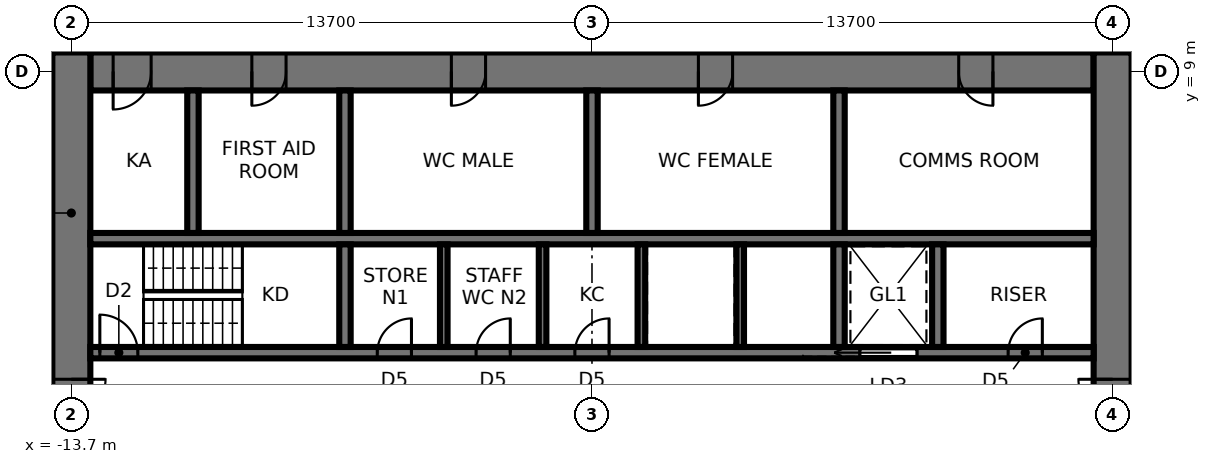
"""IFC4 building model, lengths in metres.
Left out: names, types, materials, properties, quantities, classifications, styles, units other than length and angle.
Written with IfcOpenShell. Run it as: python <this file> out.ifc"""

import sys

from ifc_helpers import new_model, si_unit, direction, frame, frame_2d, origin, place, context, subcontext, project, spatial, rectangle, extrude, element, fill, save


model = new_model("IFC4")
c1 = context("Model", 3, precision=1e-05, world=origin(), true_north=direction((0.0, 1.0)))
c2 = subcontext(c1, "Body", "Model", "MODEL_VIEW")
j1 = project(units=[si_unit("LENGTHUNIT", "METRE"), si_unit("PLANEANGLEUNIT", "RADIAN")], contexts=[c1])
p1 = place(None, origin())
s1 = spatial("IfcSite", under=j1, at=p1, CompositionType="ELEMENT")
p2 = place(p1, origin())
s2 = spatial("IfcBuilding", under=s1, at=p2, CompositionType="ELEMENT")
p3 = place(p2, frame((0.0, 0.0, 108.0)))
s3 = spatial("IfcBuildingStorey", under=s2, at=p3, CompositionType="ELEMENT", Elevation=108.0)
p4 = place(p3, frame((13.2, 9.0, 0.0), z_axis=(0.0, 0.0, 1.0), x_axis=(-1.0, 0.0, 0.0)))
e1 = element("IfcWall", 1, at=p4, inside=s3, PredefinedType="SHEAR", context=c2, shape_type="SweptSolid", body=[
    extrude(rectangle(XDim=26.4, YDim=1.0, at=frame_2d((13.2, 0.0))), origin(), (0.0, 0.0, 1.0), 3.9),
])
p5 = place(p4, frame((2.65, 0.0, 0.0)))
e2 = element("IfcOpeningElement", 2, at=p5, cuts=e1, PredefinedType="OPENING", context=c2, shape_type="SweptSolid", body=[
    extrude(rectangle(XDim=0.9, YDim=2.1, at=frame_2d((0.45, 1.05))), frame((0.0, 0.51, 0.0), z_axis=(0.0, -1.0, 0.0), x_axis=(1.0, 0.0, 0.0)), (0.0, 0.0, 1.0), 1.02),
])
p6 = place(p4, frame((9.5, 0.0, 0.0)))
e3 = element("IfcOpeningElement", 3, at=p6, cuts=e1, PredefinedType="OPENING", context=c2, shape_type="SweptSolid", body=[
    extrude(rectangle(XDim=0.9, YDim=2.1, at=frame_2d((0.45, 1.05))), frame((0.0, 0.51, 0.0), z_axis=(0.0, -1.0, 0.0), x_axis=(1.0, 0.0, 0.0)), (0.0, 0.0, 1.0), 1.02),
])
p7 = place(p4, frame((16.0, 0.0, 0.0)))
e4 = element("IfcOpeningElement", 4, at=p7, cuts=e1, PredefinedType="OPENING", context=c2, shape_type="SweptSolid", body=[
    extrude(rectangle(XDim=0.9, YDim=2.1, at=frame_2d((0.45, 1.05))), frame((0.0, 0.51, 0.0), z_axis=(0.0, -1.0, 0.0), x_axis=(1.0, 0.0, 0.0)), (0.0, 0.0, 1.0), 1.02),
])
p8 = place(p4, frame((21.25, 0.0, 0.0)))
e5 = element("IfcOpeningElement", 5, at=p8, cuts=e1, PredefinedType="OPENING", context=c2, shape_type="SweptSolid", body=[
    extrude(rectangle(XDim=0.9, YDim=2.1, at=frame_2d((0.45, 1.05))), frame((0.0, 0.51, 0.0), z_axis=(0.0, -1.0, 0.0), x_axis=(1.0, 0.0, 0.0)), (0.0, 0.0, 1.0), 1.02),
])
p9 = place(p4, frame((24.8, 0.0, 0.0)))
e6 = element("IfcOpeningElement", 6, at=p9, cuts=e1, PredefinedType="OPENING", context=c2, shape_type="SweptSolid", body=[
    extrude(rectangle(XDim=1.0, YDim=2.1, at=frame_2d((0.5, 1.05))), frame((0.0, 0.51, 0.0), z_axis=(0.0, -1.0, 0.0), x_axis=(1.0, 0.0, 0.0)), (0.0, 0.0, 1.0), 1.02),
])
p10 = place(p3, frame((13.7, -9.5, 0.0), z_axis=(0.0, 0.0, 1.0), x_axis=(0.0, 1.0, 0.0)))
e7 = element("IfcWall", 7, at=p10, inside=s3, PredefinedType="SHEAR", context=c2, shape_type="SweptSolid", body=[
    extrude(rectangle(XDim=19.0, YDim=1.0, at=frame_2d((9.5, 0.0))), origin(), (0.0, 0.0, 1.0), 3.9),
])
p11 = place(p10, frame((8.6, 0.0, 0.0)))
e8 = element("IfcOpeningElement", 8, at=p11, cuts=e7, PredefinedType="OPENING", context=c2, shape_type="SweptSolid", body=[
    extrude(rectangle(XDim=1.8, YDim=2.4, at=frame_2d((0.9, 1.2))), frame((0.0, 0.51, 0.0), z_axis=(0.0, -1.0, 0.0), x_axis=(1.0, 0.0, 0.0)), (0.0, 0.0, 1.0), 1.02),
])
p12 = place(p3, frame((-13.7, 9.5, 0.0), z_axis=(0.0, 0.0, 1.0), x_axis=(0.0, -1.0, 0.0)))
e9 = element("IfcWall", 9, at=p12, inside=s3, PredefinedType="SHEAR", context=c2, shape_type="SweptSolid", body=[
    extrude(rectangle(XDim=19.0, YDim=1.0, at=frame_2d((9.5, 0.0))), origin(), (0.0, 0.0, 1.0), 3.9),
])
p13 = place(p12, frame((8.6, 0.0, 0.0)))
e10 = element("IfcOpeningElement", 10, at=p13, cuts=e9, PredefinedType="OPENING", context=c2, shape_type="SweptSolid", body=[
    extrude(rectangle(XDim=1.8, YDim=2.4, at=frame_2d((0.9, 1.2))), frame((0.0, 0.51, 0.0), z_axis=(0.0, -1.0, 0.0), x_axis=(1.0, 0.0, 0.0)), (0.0, 0.0, 1.0), 1.02),
])
p14 = place(p3, frame((-13.2, 1.6, 0.0), z_axis=(0.0, 0.0, 1.0), x_axis=(1.0, 0.0, 0.0)))
e11 = element("IfcWall", 11, at=p14, inside=s3, PredefinedType="SHEAR", context=c2, shape_type="SweptSolid", body=[
    extrude(rectangle(XDim=26.4, YDim=0.3, at=frame_2d((13.2, 0.0))), origin(), (0.0, 0.0, 1.0), 3.9),
])
p15 = place(p14, frame((0.25, 0.0, 0.0)))
e12 = element("IfcOpeningElement", 12, at=p15, cuts=e11, PredefinedType="OPENING", context=c2, shape_type="SweptSolid", body=[
    extrude(rectangle(XDim=1.0, YDim=2.1, at=frame_2d((0.5, 1.05))), frame((0.0, 0.16, 0.0), z_axis=(0.0, -1.0, 0.0), x_axis=(1.0, 0.0, 0.0)), (0.0, 0.0, 1.0), 0.32),
])
p16 = place(p14, frame((20.25, 0.0, 0.0)))
e13 = element("IfcOpeningElement", 13, at=p16, cuts=e11, PredefinedType="OPENING", context=c2, shape_type="SweptSolid", body=[
    extrude(rectangle(XDim=1.5, YDim=2.4, at=frame_2d((0.75, 1.2))), frame((0.0, 0.16, 0.0), z_axis=(0.0, -1.0, 0.0), x_axis=(1.0, 0.0, 0.0)), (0.0, 0.0, 1.0), 0.32),
])
p17 = place(p14, frame((7.55, 0.0, 0.0)))
e14 = element("IfcOpeningElement", 14, at=p17, cuts=e11, PredefinedType="OPENING", context=c2, shape_type="SweptSolid", body=[
    extrude(rectangle(XDim=0.9, YDim=2.1, at=frame_2d((0.45, 1.05))), frame((0.0, 0.16, 0.0), z_axis=(0.0, -1.0, 0.0), x_axis=(1.0, 0.0, 0.0)), (0.0, 0.0, 1.0), 0.32),
])
p18 = place(p14, frame((10.15, 0.0, 0.0)))
e15 = element("IfcOpeningElement", 15, at=p18, cuts=e11, PredefinedType="OPENING", context=c2, shape_type="SweptSolid", body=[
    extrude(rectangle(XDim=0.9, YDim=2.1, at=frame_2d((0.45, 1.05))), frame((0.0, 0.16, 0.0), z_axis=(0.0, -1.0, 0.0), x_axis=(1.0, 0.0, 0.0)), (0.0, 0.0, 1.0), 0.32),
])
p19 = place(p14, frame((12.75, 0.0, 0.0)))
e16 = element("IfcOpeningElement", 16, at=p19, cuts=e11, PredefinedType="OPENING", context=c2, shape_type="SweptSolid", body=[
    extrude(rectangle(XDim=0.9, YDim=2.1, at=frame_2d((0.45, 1.05))), frame((0.0, 0.16, 0.0), z_axis=(0.0, -1.0, 0.0), x_axis=(1.0, 0.0, 0.0)), (0.0, 0.0, 1.0), 0.32),
])
p20 = place(p14, frame((24.15, 0.0, 0.0)))
e17 = element("IfcOpeningElement", 17, at=p20, cuts=e11, PredefinedType="OPENING", context=c2, shape_type="SweptSolid", body=[
    extrude(rectangle(XDim=0.9, YDim=2.1, at=frame_2d((0.45, 1.05))), frame((0.0, 0.16, 0.0), z_axis=(0.0, -1.0, 0.0), x_axis=(1.0, 0.0, 0.0)), (0.0, 0.0, 1.0), 0.32),
])
p21 = place(p3, frame((-13.2, 4.6, 0.0), z_axis=(0.0, 0.0, 1.0), x_axis=(1.0, 0.0, 0.0)))
e18 = element("IfcWall", 18, at=p21, inside=s3, PredefinedType="SHEAR", context=c2, shape_type="SweptSolid", body=[
    extrude(rectangle(XDim=26.4, YDim=0.3, at=frame_2d((13.2, 0.0))), origin(), (0.0, 0.0, 1.0), 3.9),
])
p22 = place(p3, frame((-6.5, 1.75, 0.0), z_axis=(0.0, 0.0, 1.0), x_axis=(0.0, 1.0, 0.0)))
e19 = element("IfcWall", 19, at=p22, inside=s3, PredefinedType="SHEAR", context=c2, shape_type="SweptSolid", body=[
    extrude(rectangle(XDim=2.7, YDim=0.3, at=frame_2d((1.35, 0.0))), origin(), (0.0, 0.0, 1.0), 3.9),
])
p23 = place(p3, frame((-6.5, 4.75, 0.0), z_axis=(0.0, 0.0, 1.0), x_axis=(0.0, 1.0, 0.0)))
e20 = element("IfcWall", 20, at=p23, inside=s3, PredefinedType="SHEAR", context=c2, shape_type="SweptSolid", body=[
    extrude(rectangle(XDim=3.75, YDim=0.3, at=frame_2d((1.875, 0.0))), origin(), (0.0, 0.0, 1.0), 3.9),
])
p24 = place(p3, frame((6.5, 1.75, 0.0), z_axis=(0.0, 0.0, 1.0), x_axis=(0.0, 1.0, 0.0)))
e21 = element("IfcWall", 21, at=p24, inside=s3, PredefinedType="SHEAR", context=c2, shape_type="SweptSolid", body=[
    extrude(rectangle(XDim=2.7, YDim=0.3, at=frame_2d((1.35, 0.0))), origin(), (0.0, 0.0, 1.0), 3.9),
])
p25 = place(p3, frame((6.5, 4.75, 0.0), z_axis=(0.0, 0.0, 1.0), x_axis=(0.0, 1.0, 0.0)))
e22 = element("IfcWall", 22, at=p25, inside=s3, PredefinedType="SHEAR", context=c2, shape_type="SweptSolid", body=[
    extrude(rectangle(XDim=3.75, YDim=0.3, at=frame_2d((1.875, 0.0))), origin(), (0.0, 0.0, 1.0), 3.9),
])
for number, where, z_axis, x_axis in (
    (23, (-3.9, 1.75, 0.0), (0.0, 0.0, 1.0), (0.0, 1.0, 0.0)),
    (24, (-1.3, 1.75, 0.0), (0.0, 0.0, 1.0), (0.0, 1.0, 0.0)),
    (25, (1.3, 1.75, 0.0), (0.0, 0.0, 1.0), (0.0, 1.0, 0.0)),
    (26, (3.9, 1.75, 0.0), (0.0, 0.0, 1.0), (0.0, 1.0, 0.0)),
):
    element("IfcWall", number, at=place(p3, frame(where, z_axis=z_axis, x_axis=x_axis)), inside=s3, PredefinedType="SHEAR", context=c2, shape_type="SweptSolid", body=[
        extrude(rectangle(XDim=2.7, YDim=0.2, at=frame_2d((1.35, 0.0))), origin(), (0.0, 0.0, 1.0), 3.9),
    ])
for number, where, z_axis, x_axis in (
    (27, (0.0, 4.75, 0.0), (0.0, 0.0, 1.0), (0.0, 1.0, 0.0)),
    (28, (-10.5, 4.75, 0.0), (0.0, 0.0, 1.0), (0.0, 1.0, 0.0)),
):
    element("IfcWall", number, at=place(p3, frame(where, z_axis=z_axis, x_axis=x_axis)), inside=s3, PredefinedType="SHEAR", context=c2, shape_type="SweptSolid", body=[
        extrude(rectangle(XDim=3.75, YDim=0.3, at=frame_2d((1.875, 0.0))), origin(), (0.0, 0.0, 1.0), 3.9),
    ])
p26 = place(p3, frame((9.1, 1.75, 0.0), z_axis=(0.0, 0.0, 1.0), x_axis=(0.0, 1.0, 0.0)))
e29 = element("IfcWall", 29, at=p26, inside=s3, PredefinedType="SHEAR", context=c2, shape_type="SweptSolid", body=[
    extrude(rectangle(XDim=2.7, YDim=0.3, at=frame_2d((1.35, 0.0))), origin(), (0.0, 0.0, 1.0), 3.9),
])
p27 = place(p13, origin())
e30 = element("IfcDoor", 30, at=p27, inside=s3, OperationType="DOUBLE_DOOR_SINGLE_SWING", PredefinedType="DOOR", context=c2, shape_type="SweptSolid", body=[
    extrude(rectangle(XDim=1.72, YDim=2.36, at=frame_2d((0.9, 1.18))), frame((0.0, 0.025, 0.0), z_axis=(0.0, -1.0, 0.0), x_axis=(1.0, 0.0, 0.0)), (0.0, 0.0, 1.0), 0.05),
    extrude(rectangle(XDim=0.04, YDim=2.4, at=frame_2d((0.02, 1.2))), frame((0.0, 0.25, 0.0), z_axis=(0.0, -1.0, 0.0), x_axis=(1.0, 0.0, 0.0)), (0.0, 0.0, 1.0), 0.5),
    extrude(rectangle(XDim=0.04, YDim=2.4, at=frame_2d((1.78, 1.2))), frame((0.0, 0.25, 0.0), z_axis=(0.0, -1.0, 0.0), x_axis=(1.0, 0.0, 0.0)), (0.0, 0.0, 1.0), 0.5),
    extrude(rectangle(XDim=1.72, YDim=0.04, at=frame_2d((0.9, 2.38))), frame((0.0, 0.25, 0.0), z_axis=(0.0, -1.0, 0.0), x_axis=(1.0, 0.0, 0.0)), (0.0, 0.0, 1.0), 0.5),
])
fill(e10, e30)
p28 = place(p11, origin())
e31 = element("IfcDoor", 31, at=p28, inside=s3, OperationType="DOUBLE_DOOR_SINGLE_SWING", PredefinedType="DOOR", context=c2, shape_type="SweptSolid", body=[
    extrude(rectangle(XDim=1.72, YDim=2.36, at=frame_2d((0.9, 1.18))), frame((0.0, 0.025, 0.0), z_axis=(0.0, -1.0, 0.0), x_axis=(1.0, 0.0, 0.0)), (0.0, 0.0, 1.0), 0.05),
    extrude(rectangle(XDim=0.04, YDim=2.4, at=frame_2d((0.02, 1.2))), frame((0.0, 0.25, 0.0), z_axis=(0.0, -1.0, 0.0), x_axis=(1.0, 0.0, 0.0)), (0.0, 0.0, 1.0), 0.5),
    extrude(rectangle(XDim=0.04, YDim=2.4, at=frame_2d((1.78, 1.2))), frame((0.0, 0.25, 0.0), z_axis=(0.0, -1.0, 0.0), x_axis=(1.0, 0.0, 0.0)), (0.0, 0.0, 1.0), 0.5),
    extrude(rectangle(XDim=1.72, YDim=0.04, at=frame_2d((0.9, 2.38))), frame((0.0, 0.25, 0.0), z_axis=(0.0, -1.0, 0.0), x_axis=(1.0, 0.0, 0.0)), (0.0, 0.0, 1.0), 0.5),
])
fill(e8, e31)
p29 = place(p15, origin())
e32 = element("IfcDoor", 32, at=p29, inside=s3, OperationType="SINGLE_SWING_LEFT", PredefinedType="DOOR", context=c2, shape_type="SweptSolid", body=[
    extrude(rectangle(XDim=1.0, YDim=2.1, at=frame_2d((0.5, 1.05))), frame((0.0, 0.025, 0.0), z_axis=(0.0, -1.0, 0.0), x_axis=(1.0, 0.0, 0.0)), (0.0, 0.0, 1.0), 0.05),
])
fill(e12, e32)
p30 = place(p16, origin())
e33 = element("IfcDoor", 33, at=p30, inside=s3, OperationType="SLIDING_TO_LEFT", PredefinedType="DOOR", context=c2, shape_type="SweptSolid", body=[
    extrude(rectangle(XDim=1.5, YDim=2.4, at=frame_2d((0.75, 1.2))), frame((0.0, 0.025, 0.0), z_axis=(0.0, -1.0, 0.0), x_axis=(1.0, 0.0, 0.0)), (0.0, 0.0, 1.0), 0.05),
])
fill(e13, e33)
p31 = place(p17, origin())
e34 = element("IfcDoor", 34, at=p31, inside=s3, OperationType="SINGLE_SWING_RIGHT", PredefinedType="DOOR", context=c2, shape_type="SweptSolid", body=[
    extrude(rectangle(XDim=0.9, YDim=2.1, at=frame_2d((0.45, 1.05))), frame((0.0, 0.025, 0.0), z_axis=(0.0, -1.0, 0.0), x_axis=(1.0, 0.0, 0.0)), (0.0, 0.0, 1.0), 0.05),
])
fill(e14, e34)
p32 = place(p18, origin())
e35 = element("IfcDoor", 35, at=p32, inside=s3, OperationType="SINGLE_SWING_RIGHT", PredefinedType="DOOR", context=c2, shape_type="SweptSolid", body=[
    extrude(rectangle(XDim=0.9, YDim=2.1, at=frame_2d((0.45, 1.05))), frame((0.0, 0.025, 0.0), z_axis=(0.0, -1.0, 0.0), x_axis=(1.0, 0.0, 0.0)), (0.0, 0.0, 1.0), 0.05),
])
fill(e15, e35)
p33 = place(p19, origin())
e36 = element("IfcDoor", 36, at=p33, inside=s3, OperationType="SINGLE_SWING_RIGHT", PredefinedType="DOOR", context=c2, shape_type="SweptSolid", body=[
    extrude(rectangle(XDim=0.9, YDim=2.1, at=frame_2d((0.45, 1.05))), frame((0.0, 0.025, 0.0), z_axis=(0.0, -1.0, 0.0), x_axis=(1.0, 0.0, 0.0)), (0.0, 0.0, 1.0), 0.05),
])
fill(e16, e36)
p34 = place(p20, origin())
e37 = element("IfcDoor", 37, at=p34, inside=s3, OperationType="SINGLE_SWING_RIGHT", PredefinedType="DOOR", context=c2, shape_type="SweptSolid", body=[
    extrude(rectangle(XDim=0.9, YDim=2.1, at=frame_2d((0.45, 1.05))), frame((0.0, 0.025, 0.0), z_axis=(0.0, -1.0, 0.0), x_axis=(1.0, 0.0, 0.0)), (0.0, 0.0, 1.0), 0.05),
])
fill(e17, e37)
p35 = place(p5, origin())
e38 = element("IfcDoor", 38, at=p35, inside=s3, OperationType="SINGLE_SWING_LEFT", PredefinedType="DOOR", context=c2, shape_type="SweptSolid", body=[
    extrude(rectangle(XDim=0.82, YDim=2.06, at=frame_2d((0.45, 1.03))), frame((0.0, 0.025, 0.0), z_axis=(0.0, -1.0, 0.0), x_axis=(1.0, 0.0, 0.0)), (0.0, 0.0, 1.0), 0.05),
    extrude(rectangle(XDim=0.04, YDim=2.1, at=frame_2d((0.02, 1.05))), frame((0.0, 0.25, 0.0), z_axis=(0.0, -1.0, 0.0), x_axis=(1.0, 0.0, 0.0)), (0.0, 0.0, 1.0), 0.5),
    extrude(rectangle(XDim=0.04, YDim=2.1, at=frame_2d((0.88, 1.05))), frame((0.0, 0.25, 0.0), z_axis=(0.0, -1.0, 0.0), x_axis=(1.0, 0.0, 0.0)), (0.0, 0.0, 1.0), 0.5),
    extrude(rectangle(XDim=0.82, YDim=0.04, at=frame_2d((0.45, 2.08))), frame((0.0, 0.25, 0.0), z_axis=(0.0, -1.0, 0.0), x_axis=(1.0, 0.0, 0.0)), (0.0, 0.0, 1.0), 0.5),
])
fill(e2, e38)
p36 = place(p6, origin())
e39 = element("IfcDoor", 39, at=p36, inside=s3, OperationType="SINGLE_SWING_RIGHT", PredefinedType="DOOR", context=c2, shape_type="SweptSolid", body=[
    extrude(rectangle(XDim=0.82, YDim=2.06, at=frame_2d((0.45, 1.03))), frame((0.0, 0.025, 0.0), z_axis=(0.0, -1.0, 0.0), x_axis=(1.0, 0.0, 0.0)), (0.0, 0.0, 1.0), 0.05),
    extrude(rectangle(XDim=0.04, YDim=2.1, at=frame_2d((0.02, 1.05))), frame((0.0, 0.25, 0.0), z_axis=(0.0, -1.0, 0.0), x_axis=(1.0, 0.0, 0.0)), (0.0, 0.0, 1.0), 0.5),
    extrude(rectangle(XDim=0.04, YDim=2.1, at=frame_2d((0.88, 1.05))), frame((0.0, 0.25, 0.0), z_axis=(0.0, -1.0, 0.0), x_axis=(1.0, 0.0, 0.0)), (0.0, 0.0, 1.0), 0.5),
    extrude(rectangle(XDim=0.82, YDim=0.04, at=frame_2d((0.45, 2.08))), frame((0.0, 0.25, 0.0), z_axis=(0.0, -1.0, 0.0), x_axis=(1.0, 0.0, 0.0)), (0.0, 0.0, 1.0), 0.5),
])
fill(e3, e39)
p37 = place(p7, origin())
e40 = element("IfcDoor", 40, at=p37, inside=s3, OperationType="SINGLE_SWING_RIGHT", PredefinedType="DOOR", context=c2, shape_type="SweptSolid", body=[
    extrude(rectangle(XDim=0.82, YDim=2.06, at=frame_2d((0.45, 1.03))), frame((0.0, 0.025, 0.0), z_axis=(0.0, -1.0, 0.0), x_axis=(1.0, 0.0, 0.0)), (0.0, 0.0, 1.0), 0.05),
    extrude(rectangle(XDim=0.04, YDim=2.1, at=frame_2d((0.02, 1.05))), frame((0.0, 0.25, 0.0), z_axis=(0.0, -1.0, 0.0), x_axis=(1.0, 0.0, 0.0)), (0.0, 0.0, 1.0), 0.5),
    extrude(rectangle(XDim=0.04, YDim=2.1, at=frame_2d((0.88, 1.05))), frame((0.0, 0.25, 0.0), z_axis=(0.0, -1.0, 0.0), x_axis=(1.0, 0.0, 0.0)), (0.0, 0.0, 1.0), 0.5),
    extrude(rectangle(XDim=0.82, YDim=0.04, at=frame_2d((0.45, 2.08))), frame((0.0, 0.25, 0.0), z_axis=(0.0, -1.0, 0.0), x_axis=(1.0, 0.0, 0.0)), (0.0, 0.0, 1.0), 0.5),
])
fill(e4, e40)
p38 = place(p8, origin())
e41 = element("IfcDoor", 41, at=p38, inside=s3, OperationType="SINGLE_SWING_RIGHT", PredefinedType="DOOR", context=c2, shape_type="SweptSolid", body=[
    extrude(rectangle(XDim=0.82, YDim=2.06, at=frame_2d((0.45, 1.03))), frame((0.0, 0.025, 0.0), z_axis=(0.0, -1.0, 0.0), x_axis=(1.0, 0.0, 0.0)), (0.0, 0.0, 1.0), 0.05),
    extrude(rectangle(XDim=0.04, YDim=2.1, at=frame_2d((0.02, 1.05))), frame((0.0, 0.25, 0.0), z_axis=(0.0, -1.0, 0.0), x_axis=(1.0, 0.0, 0.0)), (0.0, 0.0, 1.0), 0.5),
    extrude(rectangle(XDim=0.04, YDim=2.1, at=frame_2d((0.88, 1.05))), frame((0.0, 0.25, 0.0), z_axis=(0.0, -1.0, 0.0), x_axis=(1.0, 0.0, 0.0)), (0.0, 0.0, 1.0), 0.5),
    extrude(rectangle(XDim=0.82, YDim=0.04, at=frame_2d((0.45, 2.08))), frame((0.0, 0.25, 0.0), z_axis=(0.0, -1.0, 0.0), x_axis=(1.0, 0.0, 0.0)), (0.0, 0.0, 1.0), 0.5),
])
fill(e5, e41)
p39 = place(p9, origin())
e42 = element("IfcDoor", 42, at=p39, inside=s3, OperationType="SINGLE_SWING_RIGHT", PredefinedType="DOOR", context=c2, shape_type="SweptSolid", body=[
    extrude(rectangle(XDim=0.92, YDim=2.06, at=frame_2d((0.5, 1.03))), frame((0.0, 0.025, 0.0), z_axis=(0.0, -1.0, 0.0), x_axis=(1.0, 0.0, 0.0)), (0.0, 0.0, 1.0), 0.05),
    extrude(rectangle(XDim=0.04, YDim=2.1, at=frame_2d((0.02, 1.05))), frame((0.0, 0.25, 0.0), z_axis=(0.0, -1.0, 0.0), x_axis=(1.0, 0.0, 0.0)), (0.0, 0.0, 1.0), 0.5),
    extrude(rectangle(XDim=0.04, YDim=2.1, at=frame_2d((0.98, 1.05))), frame((0.0, 0.25, 0.0), z_axis=(0.0, -1.0, 0.0), x_axis=(1.0, 0.0, 0.0)), (0.0, 0.0, 1.0), 0.5),
    extrude(rectangle(XDim=0.92, YDim=0.04, at=frame_2d((0.5, 2.08))), frame((0.0, 0.25, 0.0), z_axis=(0.0, -1.0, 0.0), x_axis=(1.0, 0.0, 0.0)), (0.0, 0.0, 1.0), 0.5),
])
fill(e6, e42)
save(model, sys.argv[1])
